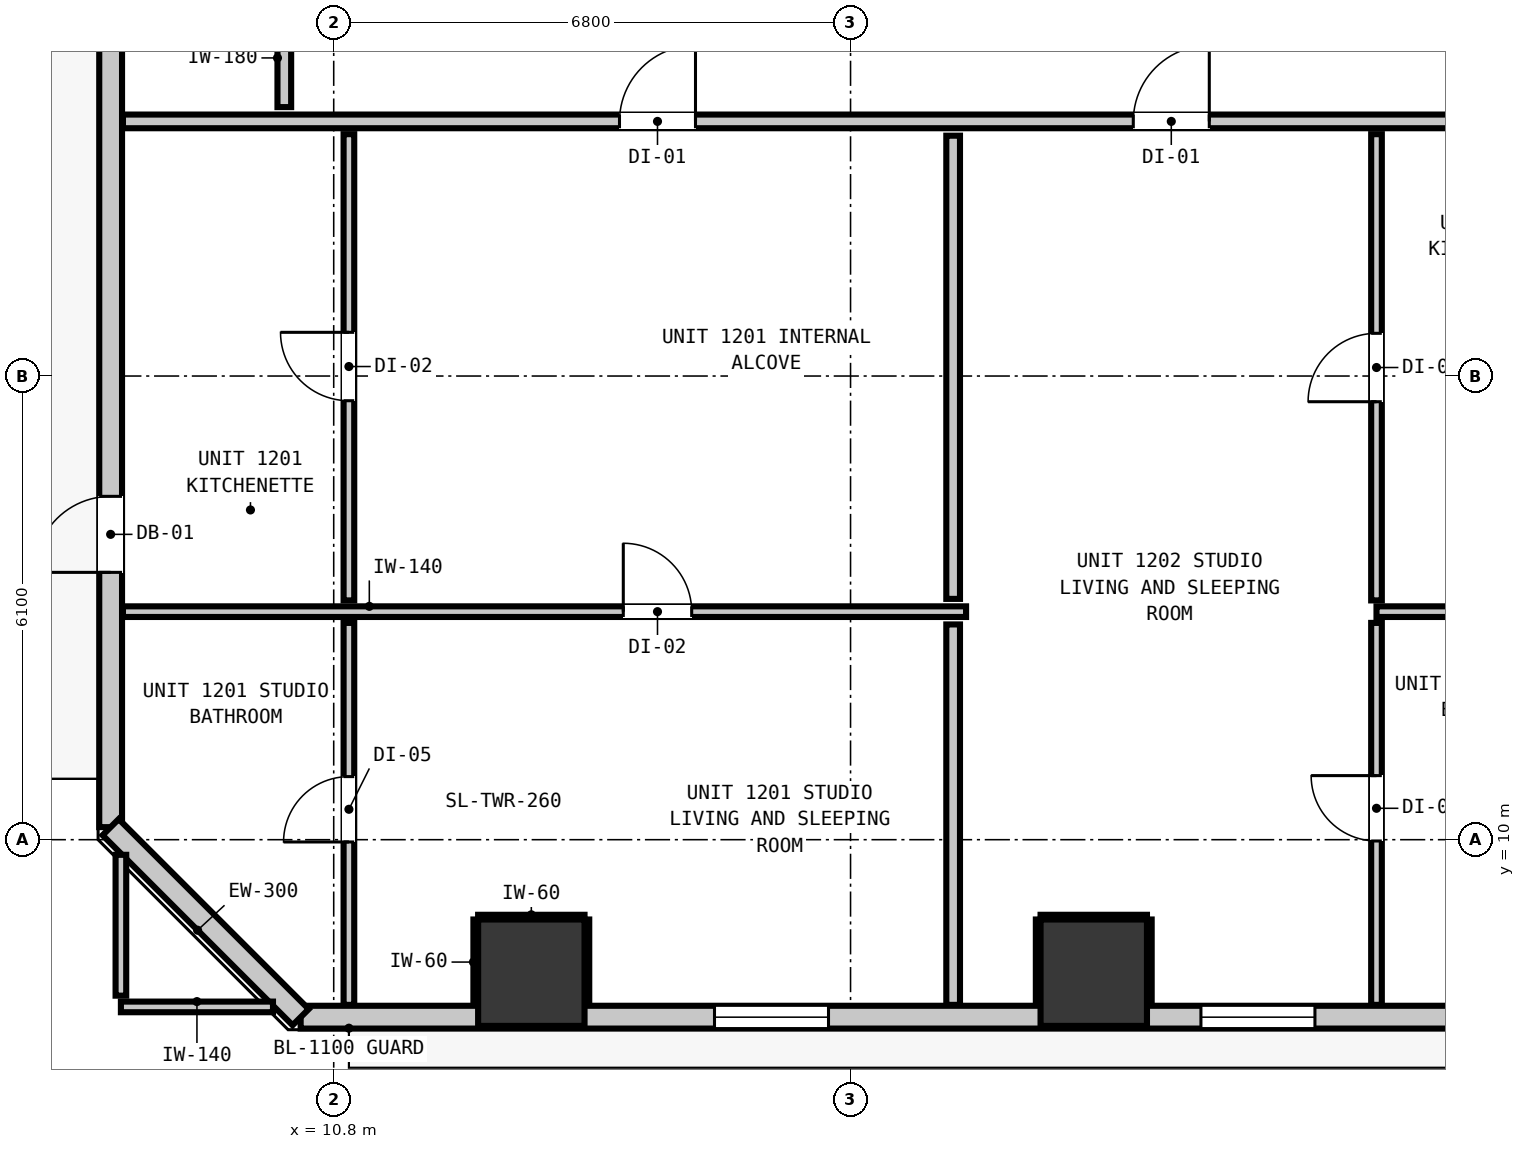
"""IFC4 building model, lengths in metres.
Left out: names, types, materials, properties, quantities, classifications, styles, units other than length and angle.
Written with IfcOpenShell. Run it as: python <this file> out.ifc"""

import sys

from ifc_helpers import new_model, si_unit, direction, frame, frame_2d, origin, origin_2d, place, context, subcontext, project, spatial, rectangle, extrude, element, fill, save


model = new_model("IFC4")
c1 = context("Model", 3, precision=1e-05, world=origin(), true_north=direction((0.0, 1.0)))
c2 = subcontext(c1, "Body", "Model", "MODEL_VIEW")
j1 = project(units=[si_unit("LENGTHUNIT", "METRE"), si_unit("PLANEANGLEUNIT", "RADIAN")], contexts=[c1])
p1 = place(None, origin())
s1 = spatial("IfcSite", under=j1, at=p1, CompositionType="ELEMENT")
p2 = place(p1, origin())
s2 = spatial("IfcBuilding", under=s1, at=p2, CompositionType="ELEMENT")
p3 = place(p2, frame((0.0, 0.0, 45.24)))
s3 = spatial("IfcBuildingStorey", under=s2, at=p3, CompositionType="ELEMENT", Elevation=45.24)
for number, where, z_axis, x_axis in (
    (1, (13.4, 8.25, 0.0), (0.0, 0.0, 1.0), (1.0, 0.0, 0.0)),
    (2, (20.8, 8.25, 0.0), (0.0, 0.0, 1.0), (1.0, 0.0, 0.0)),
):
    element("IfcColumn", number, at=place(p3, frame(where, z_axis=z_axis, x_axis=x_axis)), inside=s3, PredefinedType="COLUMN", context=c2, shape_type="SweptSolid", body=[
        extrude(rectangle(XDim=1.4, YDim=1.4, at=origin_2d()), origin(), (0.0, 0.0, 1.0), 3.32),
    ])
p4 = place(p3, frame((7.865, 10.165, 0.0), z_axis=(0.0, 0.0, 1.0), x_axis=(0.0, 1.0, 0.0)))
e3 = element("IfcWall", 3, at=p4, inside=s3, PredefinedType="STANDARD", context=c2, shape_type="SweptSolid", body=[
    extrude(rectangle(XDim=34.67, YDim=0.3, at=frame_2d((17.335, 0.0))), origin(), (0.0, 0.0, 1.0), 3.06),
])
p5 = place(p4, frame((3.352, 0.0, 0.0)))
e4 = element("IfcOpeningElement", 4, at=p5, cuts=e3, PredefinedType="OPENING", context=c2, shape_type="SweptSolid", body=[
    extrude(rectangle(XDim=1.0, YDim=2.15, at=frame_2d((0.5, 1.075))), frame((0.0, 0.16, 0.0), z_axis=(0.0, -1.0, 0.0), x_axis=(1.0, 0.0, 0.0)), (0.0, 0.0, 1.0), 0.32),
])
p6 = place(p3, frame((47.835, 7.665, 0.0), z_axis=(0.0, 0.0, 1.0), x_axis=(-1.0, 0.0, 0.0)))
e5 = element("IfcWall", 5, at=p6, inside=s3, PredefinedType="STANDARD", context=c2, shape_type="SweptSolid", body=[
    extrude(rectangle(XDim=37.47, YDim=0.3, at=frame_2d((18.735, 0.0))), origin(), (0.0, 0.0, 1.0), 3.06),
])
p7 = place(p6, frame((1.251, 0.0, 0.0)))
e6 = element("IfcOpeningElement", 6, at=p7, cuts=e5, PredefinedType="OPENING", context=c2, shape_type="SweptSolid", body=[
    extrude(rectangle(XDim=1.0, YDim=2.15, at=frame_2d((0.5, 1.075))), frame((0.0, 0.16, 0.0), z_axis=(0.0, -1.0, 0.0), x_axis=(1.0, 0.0, 0.0)), (0.0, 0.0, 1.0), 0.32),
])
p8 = place(p6, frame((30.525, 0.0, 0.85)))
e7 = element("IfcOpeningElement", 7, at=p8, cuts=e5, PredefinedType="OPENING", context=c2, shape_type="SweptSolid", body=[
    extrude(rectangle(XDim=1.5, YDim=1.8, at=frame_2d((0.75, 0.9))), frame((0.0, 0.16, 0.0), z_axis=(0.0, -1.0, 0.0), x_axis=(1.0, 0.0, 0.0)), (0.0, 0.0, 1.0), 0.32),
])
p9 = place(p6, frame((24.125, 0.0, 0.85)))
e8 = element("IfcOpeningElement", 8, at=p9, cuts=e5, PredefinedType="OPENING", context=c2, shape_type="SweptSolid", body=[
    extrude(rectangle(XDim=1.5, YDim=1.8, at=frame_2d((0.75, 0.9))), frame((0.0, 0.16, 0.0), z_axis=(0.0, -1.0, 0.0), x_axis=(1.0, 0.0, 0.0)), (0.0, 0.0, 1.0), 0.32),
])
p10 = place(p6, frame((14.119, 0.0, 0.85)))
e9 = element("IfcOpeningElement", 9, at=p10, cuts=e5, PredefinedType="OPENING", context=c2, shape_type="SweptSolid", body=[
    extrude(rectangle(XDim=1.5, YDim=1.8, at=frame_2d((0.75, 0.9))), frame((0.0, 0.16, 0.0), z_axis=(0.0, -1.0, 0.0), x_axis=(1.0, 0.0, 0.0)), (0.0, 0.0, 1.0), 0.32),
])
p11 = place(p6, frame((17.139, 0.0, 0.85)))
e10 = element("IfcOpeningElement", 10, at=p11, cuts=e5, PredefinedType="OPENING", context=c2, shape_type="SweptSolid", body=[
    extrude(rectangle(XDim=0.58, YDim=1.5, at=frame_2d((0.29, 0.75))), frame((0.0, 0.16, 0.0), z_axis=(0.0, -1.0, 0.0), x_axis=(1.0, 0.0, 0.0)), (0.0, 0.0, 1.0), 0.32),
])
p12 = place(p6, frame((8.837, 0.0, 0.85)))
e11 = element("IfcOpeningElement", 11, at=p12, cuts=e5, PredefinedType="OPENING", context=c2, shape_type="SweptSolid", body=[
    extrude(rectangle(XDim=1.5, YDim=1.8, at=frame_2d((0.75, 0.9))), frame((0.0, 0.16, 0.0), z_axis=(0.0, -1.0, 0.0), x_axis=(1.0, 0.0, 0.0)), (0.0, 0.0, 1.0), 0.32),
])
p13 = place(p6, frame((4.645, 0.0, 0.85)))
e12 = element("IfcOpeningElement", 12, at=p13, cuts=e5, PredefinedType="OPENING", context=c2, shape_type="SweptSolid", body=[
    extrude(rectangle(XDim=1.5, YDim=1.8, at=frame_2d((0.75, 0.9))), frame((0.0, 0.16, 0.0), z_axis=(0.0, -1.0, 0.0), x_axis=(1.0, 0.0, 0.0)), (0.0, 0.0, 1.0), 0.32),
])
p14 = place(p3, frame((10.365, 7.665, 0.0), z_axis=(0.0, 0.0, 1.0), x_axis=(-0.707106781187, 0.707106781187, 0.0)))
e13 = element("IfcWall", 13, at=p14, inside=s3, PredefinedType="STANDARD", context=c2, shape_type="SweptSolid", body=[
    extrude(rectangle(XDim=3.536, YDim=0.3, at=frame_2d((1.768, 0.0))), origin(), (0.0, 0.0, 1.0), 3.06),
])
p15 = place(p3, frame((8.027, 19.45, 0.0), z_axis=(0.0, 0.0, 1.0), x_axis=(1.0, 0.0, 0.0)))
e14 = element("IfcWall", 14, at=p15, inside=s3, PredefinedType="PARTITIONING", context=c2, shape_type="SweptSolid", body=[
    extrude(rectangle(XDim=42.146, YDim=0.18, at=frame_2d((21.073, 0.0))), origin(), (0.0, 0.0, 1.0), 3.06),
])
p16 = place(p15, frame((6.533, 0.0, 0.0)))
e15 = element("IfcOpeningElement", 15, at=p16, cuts=e14, PredefinedType="OPENING", context=c2, shape_type="SweptSolid", body=[
    extrude(rectangle(XDim=1.0, YDim=2.15, at=frame_2d((0.5, 1.075))), frame((0.0, 0.1, 0.0), z_axis=(0.0, -1.0, 0.0), x_axis=(1.0, 0.0, 0.0)), (0.0, 0.0, 1.0), 0.2),
])
p17 = place(p15, frame((13.293, 0.0, 0.0)))
e16 = element("IfcOpeningElement", 16, at=p17, cuts=e14, PredefinedType="OPENING", context=c2, shape_type="SweptSolid", body=[
    extrude(rectangle(XDim=1.0, YDim=2.15, at=frame_2d((0.5, 1.075))), frame((0.0, 0.1, 0.0), z_axis=(0.0, -1.0, 0.0), x_axis=(1.0, 0.0, 0.0)), (0.0, 0.0, 1.0), 0.2),
])
p18 = place(p15, frame((24.439, 0.0, 0.0)))
e17 = element("IfcOpeningElement", 17, at=p18, cuts=e14, PredefinedType="OPENING", context=c2, shape_type="SweptSolid", body=[
    extrude(rectangle(XDim=1.0, YDim=2.15, at=frame_2d((0.5, 1.075))), frame((0.0, 0.1, 0.0), z_axis=(0.0, -1.0, 0.0), x_axis=(1.0, 0.0, 0.0)), (0.0, 0.0, 1.0), 0.2),
])
p19 = place(p15, frame((34.771, 0.0, 0.0)))
e18 = element("IfcOpeningElement", 18, at=p19, cuts=e14, PredefinedType="OPENING", context=c2, shape_type="SweptSolid", body=[
    extrude(rectangle(XDim=1.0, YDim=2.15, at=frame_2d((0.5, 1.075))), frame((0.0, 0.1, 0.0), z_axis=(0.0, -1.0, 0.0), x_axis=(1.0, 0.0, 0.0)), (0.0, 0.0, 1.0), 0.2),
])
p20 = place(p3, frame((8.0, 7.8, 0.0), z_axis=(0.0, 0.0, 1.0), x_axis=(1.0, 0.0, 0.0)))
e19 = element("IfcWall", 19, at=p20, inside=s3, PredefinedType="PARTITIONING", context=c2, shape_type="SweptSolid", body=[
    extrude(rectangle(XDim=2.001, YDim=0.14, at=frame_2d((1.0, 0.0))), origin(), (0.0, 0.0, 1.0), 3.06),
])
p21 = place(p3, frame((8.027, 13.0, 0.0), z_axis=(0.0, 0.0, 1.0), x_axis=(1.0, 0.0, 0.0)))
e20 = element("IfcWall", 20, at=p21, inside=s3, PredefinedType="PARTITIONING", context=c2, shape_type="SweptSolid", body=[
    extrude(rectangle(XDim=11.093, YDim=0.14, at=frame_2d((5.546, 0.0))), origin(), (0.0, 0.0, 1.0), 3.06),
])
p22 = place(p21, frame((6.583, 0.0, 0.0)))
e21 = element("IfcOpeningElement", 21, at=p22, cuts=e20, PredefinedType="OPENING", context=c2, shape_type="SweptSolid", body=[
    extrude(rectangle(XDim=0.9, YDim=2.1, at=frame_2d((0.45, 1.05))), frame((0.0, 0.08, 0.0), z_axis=(0.0, -1.0, 0.0), x_axis=(1.0, 0.0, 0.0)), (0.0, 0.0, 1.0), 0.16),
])
p23 = place(p3, frame((24.52, 13.0, 0.0), z_axis=(0.0, 0.0, 1.0), x_axis=(1.0, 0.0, 0.0)))
e22 = element("IfcWall", 22, at=p23, inside=s3, PredefinedType="PARTITIONING", context=c2, shape_type="SweptSolid", body=[
    extrude(rectangle(XDim=6.492, YDim=0.14, at=frame_2d((3.246, 0.0))), origin(), (0.0, 0.0, 1.0), 3.06),
])
p24 = place(p3, frame((10.15, 19.638, 0.0), z_axis=(0.0, 0.0, 1.0), x_axis=(0.0, 1.0, 0.0)))
e23 = element("IfcWall", 23, at=p24, inside=s3, PredefinedType="PARTITIONING", context=c2, shape_type="SweptSolid", body=[
    extrude(rectangle(XDim=1.294, YDim=0.18, at=frame_2d((0.647, 0.0))), origin(), (0.0, 0.0, 1.0), 3.06),
])
p25 = place(p3, frame((18.95, 7.827, 0.0), z_axis=(0.0, 0.0, 1.0), x_axis=(0.0, 1.0, 0.0)))
e24 = element("IfcWall", 24, at=p25, inside=s3, PredefinedType="PARTITIONING", context=c2, shape_type="SweptSolid", body=[
    extrude(rectangle(XDim=5.005, YDim=0.18, at=frame_2d((2.502, 0.0))), origin(), (0.0, 0.0, 1.0), 3.06),
])
p26 = place(p3, frame((18.95, 13.168, 0.0), z_axis=(0.0, 0.0, 1.0), x_axis=(0.0, 1.0, 0.0)))
e25 = element("IfcWall", 25, at=p26, inside=s3, PredefinedType="PARTITIONING", context=c2, shape_type="SweptSolid", body=[
    extrude(rectangle(XDim=6.094, YDim=0.18, at=frame_2d((3.047, 0.0))), origin(), (0.0, 0.0, 1.0), 3.06),
])
p27 = place(p3, frame((8.0, 7.948, 0.0), z_axis=(0.0, 0.0, 1.0), x_axis=(0.0, 1.0, 0.0)))
e26 = element("IfcWall", 26, at=p27, inside=s3, PredefinedType="PARTITIONING", context=c2, shape_type="SweptSolid", body=[
    extrude(rectangle(XDim=1.853, YDim=0.14, at=frame_2d((0.927, 0.0))), origin(), (0.0, 0.0, 1.0), 3.06),
])
p28 = place(p3, frame((11.0, 7.827, 0.0), z_axis=(0.0, 0.0, 1.0), x_axis=(0.0, 1.0, 0.0)))
e27 = element("IfcWall", 27, at=p28, inside=s3, PredefinedType="PARTITIONING", context=c2, shape_type="SweptSolid", body=[
    extrude(rectangle(XDim=5.025, YDim=0.14, at=frame_2d((2.513, 0.0))), origin(), (0.0, 0.0, 1.0), 3.06),
])
p29 = place(p28, frame((2.143, 0.0, 0.0)))
e28 = element("IfcOpeningElement", 28, at=p29, cuts=e27, PredefinedType="OPENING", context=c2, shape_type="SweptSolid", body=[
    extrude(rectangle(XDim=0.86, YDim=2.02, at=frame_2d((0.43, 1.01))), frame((0.0, 0.08, 0.0), z_axis=(0.0, -1.0, 0.0), x_axis=(1.0, 0.0, 0.0)), (0.0, 0.0, 1.0), 0.16),
])
p30 = place(p3, frame((11.0, 13.148, 0.0), z_axis=(0.0, 0.0, 1.0), x_axis=(0.0, 1.0, 0.0)))
e29 = element("IfcWall", 29, at=p30, inside=s3, PredefinedType="PARTITIONING", context=c2, shape_type="SweptSolid", body=[
    extrude(rectangle(XDim=6.134, YDim=0.14, at=frame_2d((3.067, 0.0))), origin(), (0.0, 0.0, 1.0), 2.445),
])
p31 = place(p30, frame((2.627, 0.0, 0.0)))
e30 = element("IfcOpeningElement", 30, at=p31, cuts=e29, PredefinedType="OPENING", context=c2, shape_type="SweptSolid", body=[
    extrude(rectangle(XDim=0.9, YDim=2.1, at=frame_2d((0.45, 1.05))), frame((0.0, 0.08, 0.0), z_axis=(0.0, -1.0, 0.0), x_axis=(1.0, 0.0, 0.0)), (0.0, 0.0, 1.0), 0.16),
])
p32 = place(p3, frame((24.52, 7.827, 0.0), z_axis=(0.0, 0.0, 1.0), x_axis=(0.0, 1.0, 0.0)))
e31 = element("IfcWall", 31, at=p32, inside=s3, PredefinedType="PARTITIONING", context=c2, shape_type="SweptSolid", body=[
    extrude(rectangle(XDim=5.025, YDim=0.14, at=frame_2d((2.513, 0.0))), origin(), (0.0, 0.0, 1.0), 3.06),
])
p33 = place(p32, frame((2.156, 0.0, 0.0)))
e32 = element("IfcOpeningElement", 32, at=p33, cuts=e31, PredefinedType="OPENING", context=c2, shape_type="SweptSolid", body=[
    extrude(rectangle(XDim=0.86, YDim=2.02, at=frame_2d((0.43, 1.01))), frame((0.0, 0.08, 0.0), z_axis=(0.0, -1.0, 0.0), x_axis=(1.0, 0.0, 0.0)), (0.0, 0.0, 1.0), 0.16),
])
p34 = place(p3, frame((24.52, 13.148, 0.0), z_axis=(0.0, 0.0, 1.0), x_axis=(0.0, 1.0, 0.0)))
e33 = element("IfcWall", 33, at=p34, inside=s3, PredefinedType="PARTITIONING", context=c2, shape_type="SweptSolid", body=[
    extrude(rectangle(XDim=6.134, YDim=0.14, at=frame_2d((3.067, 0.0))), origin(), (0.0, 0.0, 1.0), 3.06),
])
p35 = place(p34, frame((2.614, 0.0, 0.0)))
e34 = element("IfcOpeningElement", 34, at=p35, cuts=e33, PredefinedType="OPENING", context=c2, shape_type="SweptSolid", body=[
    extrude(rectangle(XDim=0.9, YDim=2.1, at=frame_2d((0.45, 1.05))), frame((0.0, 0.08, 0.0), z_axis=(0.0, -1.0, 0.0), x_axis=(1.0, 0.0, 0.0)), (0.0, 0.0, 1.0), 0.16),
])
p36 = place(p3, frame((12.7, 8.982, 0.0), z_axis=(0.0, 0.0, 1.0), x_axis=(1.0, 0.0, 0.0)))
e35 = element("IfcWall", 35, at=p36, inside=s3, PredefinedType="PARTITIONING", context=c2, shape_type="SweptSolid", body=[
    extrude(rectangle(XDim=1.4, YDim=0.06, at=frame_2d((0.7, 0.0))), origin(), (0.0, 0.0, 1.0), 1.45),
])
for number, where, z_axis, x_axis in (
    (36, (12.668, 7.83, 0.0), (0.0, 0.0, 1.0), (0.0, 1.0, 0.0)),
    (37, (14.132, 7.83, 0.0), (0.0, 0.0, 1.0), (0.0, 1.0, 0.0)),
):
    element("IfcWall", number, at=place(p3, frame(where, z_axis=z_axis, x_axis=x_axis)), inside=s3, PredefinedType="PARTITIONING", context=c2, shape_type="SweptSolid", body=[
        extrude(rectangle(XDim=1.12, YDim=0.06, at=frame_2d((0.56, 0.0))), origin(), (0.0, 0.0, 1.0), 1.45),
    ])
p37 = place(p3, frame((20.1, 8.982, 0.0), z_axis=(0.0, 0.0, 1.0), x_axis=(1.0, 0.0, 0.0)))
e38 = element("IfcWall", 38, at=p37, inside=s3, PredefinedType="PARTITIONING", context=c2, shape_type="SweptSolid", body=[
    extrude(rectangle(XDim=1.4, YDim=0.06, at=frame_2d((0.7, 0.0))), origin(), (0.0, 0.0, 1.0), 1.45),
])
for number, where, z_axis, x_axis in (
    (39, (20.068, 7.83, 0.0), (0.0, 0.0, 1.0), (0.0, 1.0, 0.0)),
    (40, (21.532, 7.83, 0.0), (0.0, 0.0, 1.0), (0.0, 1.0, 0.0)),
):
    element("IfcWall", number, at=place(p3, frame(where, z_axis=z_axis, x_axis=x_axis)), inside=s3, PredefinedType="PARTITIONING", context=c2, shape_type="SweptSolid", body=[
        extrude(rectangle(XDim=1.12, YDim=0.06, at=frame_2d((0.56, 0.0))), origin(), (0.0, 0.0, 1.0), 1.45),
    ])
p38 = place(p5, origin())
e41 = element("IfcDoor", 41, at=p38, inside=s3, OperationType="SINGLE_SWING_LEFT", PredefinedType="DOOR", context=c2, shape_type="SweptSolid", body=[
    extrude(rectangle(XDim=1.0, YDim=2.15, at=frame_2d((0.5, 1.075))), frame((0.0, 0.025, 0.0), z_axis=(0.0, -1.0, 0.0), x_axis=(1.0, 0.0, 0.0)), (0.0, 0.0, 1.0), 0.05),
])
fill(e4, e41)
p39 = place(p8, origin())
e42 = element("IfcWindow", 42, at=p39, inside=s3, PartitioningType="SINGLE_PANEL", PredefinedType="WINDOW", context=c2, shape_type="SweptSolid", body=[
    extrude(rectangle(XDim=1.5, YDim=1.8, at=frame_2d((0.75, 0.9))), frame((0.0, 0.03, 0.0), z_axis=(0.0, -1.0, 0.0), x_axis=(1.0, 0.0, 0.0)), (0.0, 0.0, 1.0), 0.06),
])
fill(e7, e42)
p40 = place(p9, origin())
e43 = element("IfcWindow", 43, at=p40, inside=s3, PartitioningType="SINGLE_PANEL", PredefinedType="WINDOW", context=c2, shape_type="SweptSolid", body=[
    extrude(rectangle(XDim=1.5, YDim=1.8, at=frame_2d((0.75, 0.9))), frame((0.0, 0.03, 0.0), z_axis=(0.0, -1.0, 0.0), x_axis=(1.0, 0.0, 0.0)), (0.0, 0.0, 1.0), 0.06),
])
fill(e8, e43)
p41 = place(p16, origin())
e44 = element("IfcDoor", 44, at=p41, inside=s3, OperationType="SINGLE_SWING_RIGHT", PredefinedType="DOOR", context=c2, shape_type="SweptSolid", body=[
    extrude(rectangle(XDim=1.0, YDim=2.15, at=frame_2d((0.5, 1.075))), frame((0.0, 0.025, 0.0), z_axis=(0.0, -1.0, 0.0), x_axis=(1.0, 0.0, 0.0)), (0.0, 0.0, 1.0), 0.05),
])
fill(e15, e44)
p42 = place(p22, origin())
e45 = element("IfcDoor", 45, at=p42, inside=s3, OperationType="SINGLE_SWING_LEFT", PredefinedType="DOOR", context=c2, shape_type="SweptSolid", body=[
    extrude(rectangle(XDim=0.9, YDim=2.1, at=frame_2d((0.45, 1.05))), frame((0.0, 0.025, 0.0), z_axis=(0.0, -1.0, 0.0), x_axis=(1.0, 0.0, 0.0)), (0.0, 0.0, 1.0), 0.05),
])
fill(e21, e45)
p43 = place(p31, origin())
e46 = element("IfcDoor", 46, at=p43, inside=s3, OperationType="SINGLE_SWING_RIGHT", PredefinedType="DOOR", context=c2, shape_type="SweptSolid", body=[
    extrude(rectangle(XDim=0.9, YDim=2.1, at=frame_2d((0.45, 1.05))), frame((0.0, 0.025, 0.0), z_axis=(0.0, -1.0, 0.0), x_axis=(1.0, 0.0, 0.0)), (0.0, 0.0, 1.0), 0.05),
])
fill(e30, e46)
p44 = place(p29, origin())
e47 = element("IfcDoor", 47, at=p44, inside=s3, OperationType="SINGLE_SWING_LEFT", PredefinedType="DOOR", context=c2, shape_type="SweptSolid", body=[
    extrude(rectangle(XDim=0.86, YDim=2.02, at=frame_2d((0.43, 1.01))), frame((0.0, 0.025, 0.0), z_axis=(0.0, -1.0, 0.0), x_axis=(1.0, 0.0, 0.0)), (0.0, 0.0, 1.0), 0.05),
])
fill(e28, e47)
p45 = place(p17, origin())
e48 = element("IfcDoor", 48, at=p45, inside=s3, OperationType="SINGLE_SWING_RIGHT", PredefinedType="DOOR", context=c2, shape_type="SweptSolid", body=[
    extrude(rectangle(XDim=1.0, YDim=2.15, at=frame_2d((0.5, 1.075))), frame((0.0, 0.025, 0.0), z_axis=(0.0, -1.0, 0.0), x_axis=(1.0, 0.0, 0.0)), (0.0, 0.0, 1.0), 0.05),
])
fill(e16, e48)
p46 = place(p35, origin())
e49 = element("IfcDoor", 49, at=p46, inside=s3, OperationType="SINGLE_SWING_LEFT", PredefinedType="DOOR", context=c2, shape_type="SweptSolid", body=[
    extrude(rectangle(XDim=0.9, YDim=2.1, at=frame_2d((0.45, 1.05))), frame((0.0, 0.025, 0.0), z_axis=(0.0, -1.0, 0.0), x_axis=(1.0, 0.0, 0.0)), (0.0, 0.0, 1.0), 0.05),
])
fill(e34, e49)
p47 = place(p33, origin())
e50 = element("IfcDoor", 50, at=p47, inside=s3, OperationType="SINGLE_SWING_RIGHT", PredefinedType="DOOR", context=c2, shape_type="SweptSolid", body=[
    extrude(rectangle(XDim=0.86, YDim=2.02, at=frame_2d((0.43, 1.01))), frame((0.0, 0.025, 0.0), z_axis=(0.0, -1.0, 0.0), x_axis=(1.0, 0.0, 0.0)), (0.0, 0.0, 1.0), 0.05),
])
fill(e32, e50)
save(model, sys.argv[1])
